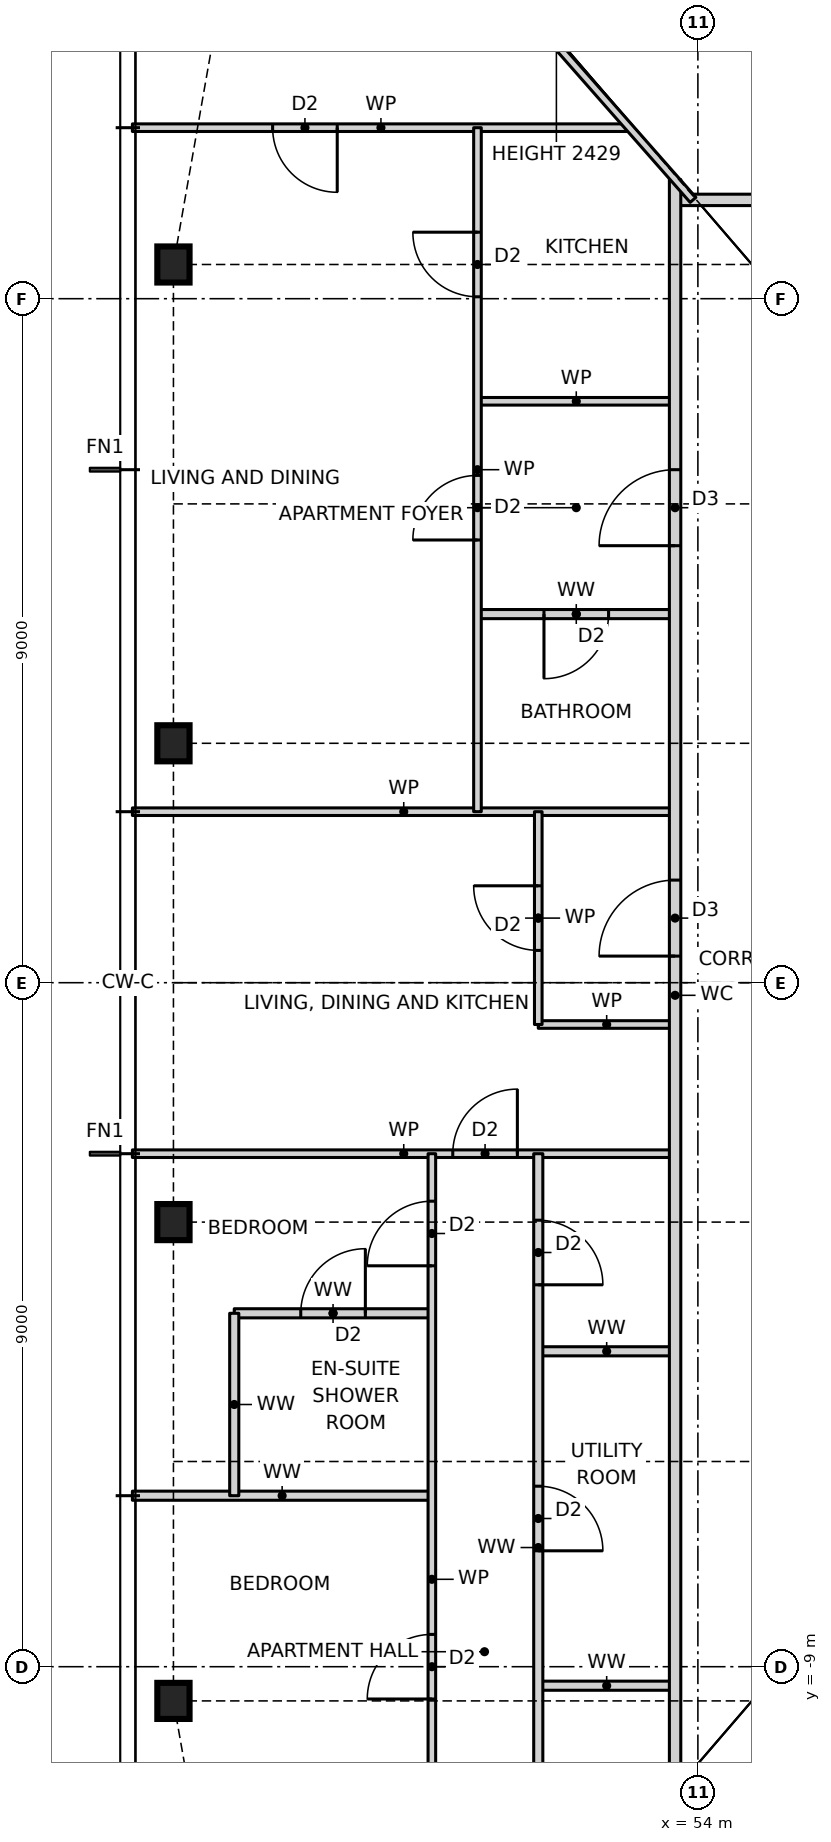
"""IFC4 building model, lengths in metres.
Left out: names, types, materials, properties, quantities, classifications, styles, units other than length and angle.
Written with IfcOpenShell. Run it as: python <this file> out.ifc"""

import sys

from ifc_helpers import new_model, si_unit, direction, frame, frame_2d, origin, origin_2d, place, context, subcontext, project, spatial, rectangle, i_section, extrude, element, fill, save


model = new_model("IFC4")
c1 = context("Model", 3, precision=1e-05, world=origin(), true_north=direction((0.0, 1.0)))
c2 = subcontext(c1, "Body", "Model", "MODEL_VIEW")
j1 = project(units=[si_unit("LENGTHUNIT", "METRE"), si_unit("PLANEANGLEUNIT", "RADIAN")], contexts=[c1])
p1 = place(None, origin())
s1 = spatial("IfcSite", under=j1, at=p1, CompositionType="ELEMENT")
p2 = place(p1, origin())
s2 = spatial("IfcBuilding", under=s1, at=p2, CompositionType="ELEMENT")
p3 = place(p2, frame((0.0, 0.0, 57.0)))
s3 = spatial("IfcBuildingStorey", under=s2, at=p3, CompositionType="ELEMENT", Elevation=57.0)
for number, where, z_axis, x_axis in (
    (1, (47.1, 9.45, 0.0), (0.0, 0.0, 1.0), (1.0, 0.0, 0.0)),
    (2, (47.1, 3.15, 0.0), (0.0, 0.0, 1.0), (1.0, 0.0, 0.0)),
    (3, (47.1, -3.15, 0.0), (0.0, 0.0, 1.0), (1.0, 0.0, 0.0)),
    (4, (47.1, -9.45, 0.0), (0.0, 0.0, 1.0), (1.0, 0.0, 0.0)),
):
    element("IfcColumn", number, at=place(p3, frame(where, z_axis=z_axis, x_axis=x_axis)), inside=s3, PredefinedType="COLUMN", context=c2, shape_type="SweptSolid", body=[
        extrude(i_section(OverallWidth=0.424, OverallDepth=0.475, WebThickness=0.048, FlangeThickness=0.077, at=origin_2d()), origin(), (0.0, 0.0, 1.0), 3.5),
    ])
p4 = place(p3, frame((51.9, -9.25, 0.0), z_axis=(0.0, 0.0, 1.0), x_axis=(1.0, 0.0, 0.0)))
e5 = element("IfcWall", 5, at=p4, inside=s3, PredefinedType="PARTITIONING", context=c2, shape_type="SweptSolid", body=[
    extrude(rectangle(XDim=1.8, YDim=0.12, at=frame_2d((0.9, 0.0))), origin(), (0.0, 0.0, 1.0), 3.27),
])
p5 = place(p3, frame((46.56, -6.75, 0.0), z_axis=(0.0, 0.0, 1.0), x_axis=(1.0, 0.0, 0.0)))
e6 = element("IfcWall", 6, at=p5, inside=s3, PredefinedType="PARTITIONING", context=c2, shape_type="SweptSolid", body=[
    extrude(rectangle(XDim=3.94, YDim=0.12, at=frame_2d((1.97, 0.0))), origin(), (0.0, 0.0, 1.0), 3.27),
])
p6 = place(p3, frame((51.9, -4.85, 0.0), z_axis=(0.0, 0.0, 1.0), x_axis=(1.0, 0.0, 0.0)))
e7 = element("IfcWall", 7, at=p6, inside=s3, PredefinedType="PARTITIONING", context=c2, shape_type="SweptSolid", body=[
    extrude(rectangle(XDim=1.8, YDim=0.12, at=frame_2d((0.9, 0.0))), origin(), (0.0, 0.0, 1.0), 3.27),
])
p7 = place(p3, frame((47.9, -4.35, 0.0), z_axis=(0.0, 0.0, 1.0), x_axis=(1.0, 0.0, 0.0)))
e8 = element("IfcWall", 8, at=p7, inside=s3, PredefinedType="PARTITIONING", context=c2, shape_type="SweptSolid", body=[
    extrude(rectangle(XDim=2.6, YDim=0.12, at=frame_2d((1.3, 0.0))), origin(), (0.0, 0.0, 1.0), 3.27),
])
p8 = place(p7, frame((0.875, 0.0, 0.0)))
e9 = element("IfcOpeningElement", 9, at=p8, cuts=e8, PredefinedType="OPENING", context=c2, shape_type="SweptSolid", body=[
    extrude(rectangle(XDim=0.85, YDim=2.1, at=frame_2d((0.425, 1.05))), frame((0.0, 0.07, 0.0), z_axis=(0.0, -1.0, 0.0), x_axis=(1.0, 0.0, 0.0)), (0.0, 0.0, 1.0), 0.14),
])
p9 = place(p3, frame((46.56, -2.25, 0.0), z_axis=(0.0, 0.0, 1.0), x_axis=(1.0, 0.0, 0.0)))
e10 = element("IfcWall", 10, at=p9, inside=s3, PredefinedType="PARTITIONING", context=c2, shape_type="SweptSolid", body=[
    extrude(rectangle(XDim=7.14, YDim=0.1, at=frame_2d((3.57, 0.0))), origin(), (0.0, 0.0, 1.0), 3.27),
])
p10 = place(p9, frame((4.215, 0.0, 0.0)))
e11 = element("IfcOpeningElement", 11, at=p10, cuts=e10, PredefinedType="OPENING", context=c2, shape_type="SweptSolid", body=[
    extrude(rectangle(XDim=0.85, YDim=2.1, at=frame_2d((0.425, 1.05))), frame((0.0, 0.06, 0.0), z_axis=(0.0, -1.0, 0.0), x_axis=(1.0, 0.0, 0.0)), (0.0, 0.0, 1.0), 0.12),
])
p11 = place(p3, frame((51.9, -0.55, 0.0), z_axis=(0.0, 0.0, 1.0), x_axis=(1.0, 0.0, 0.0)))
e12 = element("IfcWall", 12, at=p11, inside=s3, PredefinedType="PARTITIONING", context=c2, shape_type="SweptSolid", body=[
    extrude(rectangle(XDim=1.8, YDim=0.1, at=frame_2d((0.9, 0.0))), origin(), (0.0, 0.0, 1.0), 3.27),
])
p12 = place(p3, frame((46.56, 2.25, 0.0), z_axis=(0.0, 0.0, 1.0), x_axis=(1.0, 0.0, 0.0)))
e13 = element("IfcWall", 13, at=p12, inside=s3, PredefinedType="PARTITIONING", context=c2, shape_type="SweptSolid", body=[
    extrude(rectangle(XDim=7.14, YDim=0.1, at=frame_2d((3.57, 0.0))), origin(), (0.0, 0.0, 1.0), 3.27),
])
p13 = place(p3, frame((51.1, 4.85, 0.0), z_axis=(0.0, 0.0, 1.0), x_axis=(1.0, 0.0, 0.0)))
e14 = element("IfcWall", 14, at=p13, inside=s3, PredefinedType="PARTITIONING", context=c2, shape_type="SweptSolid", body=[
    extrude(rectangle(XDim=2.6, YDim=0.12, at=frame_2d((1.3, 0.0))), origin(), (0.0, 0.0, 1.0), 3.27),
])
p14 = place(p13, frame((0.875, 0.0, 0.0)))
e15 = element("IfcOpeningElement", 15, at=p14, cuts=e14, PredefinedType="OPENING", context=c2, shape_type="SweptSolid", body=[
    extrude(rectangle(XDim=0.85, YDim=2.1, at=frame_2d((0.425, 1.05))), frame((0.0, 0.07, 0.0), z_axis=(0.0, -1.0, 0.0), x_axis=(1.0, 0.0, 0.0)), (0.0, 0.0, 1.0), 0.14),
])
p15 = place(p3, frame((51.1, 7.65, 0.0), z_axis=(0.0, 0.0, 1.0), x_axis=(1.0, 0.0, 0.0)))
e16 = element("IfcWall", 16, at=p15, inside=s3, PredefinedType="PARTITIONING", context=c2, shape_type="SweptSolid", body=[
    extrude(rectangle(XDim=2.6, YDim=0.1, at=frame_2d((1.3, 0.0))), origin(), (0.0, 0.0, 1.0), 3.27),
])
p16 = place(p3, frame((53.7, 10.3, 0.0), z_axis=(0.0, 0.0, 1.0), x_axis=(1.0, 0.0, 0.0)))
e17 = element("IfcWall", 17, at=p16, inside=s3, PredefinedType="PARTITIONING", context=c2, shape_type="SweptSolid", body=[
    extrude(rectangle(XDim=18.6, YDim=0.15, at=frame_2d((9.3, 0.0))), origin(), (0.0, 0.0, 1.0), 3.27),
])
p17 = place(p16, frame((12.8, 0.0, 0.0)))
e18 = element("IfcOpeningElement", 18, at=p17, cuts=e17, PredefinedType="OPENING", context=c2, shape_type="SweptSolid", body=[
    extrude(rectangle(XDim=1.0, YDim=2.1, at=frame_2d((0.5, 1.05))), frame((0.0, 0.085, 0.0), z_axis=(0.0, -1.0, 0.0), x_axis=(1.0, 0.0, 0.0)), (0.0, 0.0, 1.0), 0.17),
])
p18 = place(p3, frame((46.56, 11.25, 0.0), z_axis=(0.0, 0.0, 1.0), x_axis=(1.0, 0.0, 0.0)))
e19 = element("IfcWall", 19, at=p18, inside=s3, PredefinedType="PARTITIONING", context=c2, shape_type="SweptSolid", body=[
    extrude(rectangle(XDim=6.54, YDim=0.1, at=frame_2d((3.27, 0.0))), origin(), (0.0, 0.0, 1.0), 3.27),
])
p19 = place(p18, frame((1.845, 0.0, 0.0)))
e20 = element("IfcOpeningElement", 20, at=p19, cuts=e19, PredefinedType="OPENING", context=c2, shape_type="SweptSolid", body=[
    extrude(rectangle(XDim=0.85, YDim=2.1, at=frame_2d((0.425, 1.05))), frame((0.0, 0.06, 0.0), z_axis=(0.0, -1.0, 0.0), x_axis=(1.0, 0.0, 0.0)), (0.0, 0.0, 1.0), 0.12),
])
p20 = place(p3, frame((53.7, -10.9, 0.0), z_axis=(0.0, 0.0, 1.0), x_axis=(0.0, 1.0, 0.0)))
e21 = element("IfcWall", 21, at=p20, inside=s3, PredefinedType="PARTITIONING", context=c2, shape_type="SweptSolid", body=[
    extrude(rectangle(XDim=21.468, YDim=0.15, at=frame_2d((10.734, 0.0))), origin(), (0.0, 0.0, 1.0), 3.27),
])
p21 = place(p20, frame((16.65, 0.0, 0.0)))
e22 = element("IfcOpeningElement", 22, at=p21, cuts=e21, PredefinedType="OPENING", context=c2, shape_type="SweptSolid", body=[
    extrude(rectangle(XDim=1.0, YDim=2.1, at=frame_2d((0.5, 1.05))), frame((0.0, 0.085, 0.0), z_axis=(0.0, -1.0, 0.0), x_axis=(1.0, 0.0, 0.0)), (0.0, 0.0, 1.0), 0.17),
])
p22 = place(p20, frame((11.25, 0.0, 0.0)))
e23 = element("IfcOpeningElement", 23, at=p22, cuts=e21, PredefinedType="OPENING", context=c2, shape_type="SweptSolid", body=[
    extrude(rectangle(XDim=1.0, YDim=2.1, at=frame_2d((0.5, 1.05))), frame((0.0, 0.085, 0.0), z_axis=(0.0, -1.0, 0.0), x_axis=(1.0, 0.0, 0.0)), (0.0, 0.0, 1.0), 0.17),
])
p23 = place(p3, frame((51.9, -12.614, 0.0), z_axis=(0.0, 0.0, 1.0), x_axis=(0.0, 1.0, 0.0)))
e24 = element("IfcWall", 24, at=p23, inside=s3, PredefinedType="PARTITIONING", context=c2, shape_type="SweptSolid", body=[
    extrude(rectangle(XDim=10.364, YDim=0.12, at=frame_2d((5.182, 0.0))), origin(), (0.0, 0.0, 1.0), 3.27),
])
p24 = place(p23, frame((8.639, 0.0, 0.0)))
e25 = element("IfcOpeningElement", 25, at=p24, cuts=e24, PredefinedType="OPENING", context=c2, shape_type="SweptSolid", body=[
    extrude(rectangle(XDim=0.85, YDim=2.1, at=frame_2d((0.425, 1.05))), frame((0.0, 0.07, 0.0), z_axis=(0.0, -1.0, 0.0), x_axis=(1.0, 0.0, 0.0)), (0.0, 0.0, 1.0), 0.14),
])
p25 = place(p23, frame((5.139, 0.0, 0.0)))
e26 = element("IfcOpeningElement", 26, at=p25, cuts=e24, PredefinedType="OPENING", context=c2, shape_type="SweptSolid", body=[
    extrude(rectangle(XDim=0.85, YDim=2.1, at=frame_2d((0.425, 1.05))), frame((0.0, 0.07, 0.0), z_axis=(0.0, -1.0, 0.0), x_axis=(1.0, 0.0, 0.0)), (0.0, 0.0, 1.0), 0.14),
])
p26 = place(p23, frame((1.257, 0.0, 0.0)))
e27 = element("IfcOpeningElement", 27, at=p26, cuts=e24, PredefinedType="OPENING", context=c2, shape_type="SweptSolid", body=[
    extrude(rectangle(XDim=0.85, YDim=2.1, at=frame_2d((0.425, 1.05))), frame((0.0, 0.07, 0.0), z_axis=(0.0, -1.0, 0.0), x_axis=(1.0, 0.0, 0.0)), (0.0, 0.0, 1.0), 0.14),
])
p27 = place(p3, frame((51.9, -0.55, 0.0), z_axis=(0.0, 0.0, 1.0), x_axis=(0.0, 1.0, 0.0)))
e28 = element("IfcWall", 28, at=p27, inside=s3, PredefinedType="PARTITIONING", context=c2, shape_type="SweptSolid", body=[
    extrude(rectangle(XDim=2.8, YDim=0.1, at=frame_2d((1.4, 0.0))), origin(), (0.0, 0.0, 1.0), 3.27),
])
p28 = place(p27, frame((0.975, 0.0, 0.0)))
e29 = element("IfcOpeningElement", 29, at=p28, cuts=e28, PredefinedType="OPENING", context=c2, shape_type="SweptSolid", body=[
    extrude(rectangle(XDim=0.85, YDim=2.1, at=frame_2d((0.425, 1.05))), frame((0.0, 0.06, 0.0), z_axis=(0.0, -1.0, 0.0), x_axis=(1.0, 0.0, 0.0)), (0.0, 0.0, 1.0), 0.12),
])
p29 = place(p3, frame((51.1, 2.25, 0.0), z_axis=(0.0, 0.0, 1.0), x_axis=(0.0, 1.0, 0.0)))
e30 = element("IfcWall", 30, at=p29, inside=s3, PredefinedType="PARTITIONING", context=c2, shape_type="SweptSolid", body=[
    extrude(rectangle(XDim=9.0, YDim=0.1, at=frame_2d((4.5, 0.0))), origin(), (0.0, 0.0, 1.0), 3.27),
])
p30 = place(p29, frame((6.775, 0.0, 0.0)))
e31 = element("IfcOpeningElement", 31, at=p30, cuts=e30, PredefinedType="OPENING", context=c2, shape_type="SweptSolid", body=[
    extrude(rectangle(XDim=0.85, YDim=2.1, at=frame_2d((0.425, 1.05))), frame((0.0, 0.06, 0.0), z_axis=(0.0, -1.0, 0.0), x_axis=(1.0, 0.0, 0.0)), (0.0, 0.0, 1.0), 0.12),
])
p31 = place(p29, frame((3.575, 0.0, 0.0)))
e32 = element("IfcOpeningElement", 32, at=p31, cuts=e30, PredefinedType="OPENING", context=c2, shape_type="SweptSolid", body=[
    extrude(rectangle(XDim=0.85, YDim=2.1, at=frame_2d((0.425, 1.05))), frame((0.0, 0.06, 0.0), z_axis=(0.0, -1.0, 0.0), x_axis=(1.0, 0.0, 0.0)), (0.0, 0.0, 1.0), 0.12),
])
p32 = place(p3, frame((50.5, -13.45, 0.0), z_axis=(0.0, 0.0, 1.0), x_axis=(0.0, 1.0, 0.0)))
e33 = element("IfcWall", 33, at=p32, inside=s3, PredefinedType="PARTITIONING", context=c2, shape_type="SweptSolid", body=[
    extrude(rectangle(XDim=11.2, YDim=0.1, at=frame_2d((5.6, 0.0))), origin(), (0.0, 0.0, 1.0), 3.27),
])
p33 = place(p32, frame((9.725, 0.0, 0.0)))
e34 = element("IfcOpeningElement", 34, at=p33, cuts=e33, PredefinedType="OPENING", context=c2, shape_type="SweptSolid", body=[
    extrude(rectangle(XDim=0.85, YDim=2.1, at=frame_2d((0.425, 1.05))), frame((0.0, 0.06, 0.0), z_axis=(0.0, -1.0, 0.0), x_axis=(1.0, 0.0, 0.0)), (0.0, 0.0, 1.0), 0.12),
])
p34 = place(p32, frame((4.025, 0.0, 0.0)))
e35 = element("IfcOpeningElement", 35, at=p34, cuts=e33, PredefinedType="OPENING", context=c2, shape_type="SweptSolid", body=[
    extrude(rectangle(XDim=0.85, YDim=2.1, at=frame_2d((0.425, 1.05))), frame((0.0, 0.06, 0.0), z_axis=(0.0, -1.0, 0.0), x_axis=(1.0, 0.0, 0.0)), (0.0, 0.0, 1.0), 0.12),
])
p35 = place(p32, frame((0.675, 0.0, 0.0)))
e36 = element("IfcOpeningElement", 36, at=p35, cuts=e33, PredefinedType="OPENING", context=c2, shape_type="SweptSolid", body=[
    extrude(rectangle(XDim=0.85, YDim=2.1, at=frame_2d((0.425, 1.05))), frame((0.0, 0.06, 0.0), z_axis=(0.0, -1.0, 0.0), x_axis=(1.0, 0.0, 0.0)), (0.0, 0.0, 1.0), 0.12),
])
p36 = place(p3, frame((47.9, -6.75, 0.0), z_axis=(0.0, 0.0, 1.0), x_axis=(0.0, 1.0, 0.0)))
e37 = element("IfcWall", 37, at=p36, inside=s3, PredefinedType="PARTITIONING", context=c2, shape_type="SweptSolid", body=[
    extrude(rectangle(XDim=2.4, YDim=0.12, at=frame_2d((1.2, 0.0))), origin(), (0.0, 0.0, 1.0), 3.27),
])
p37 = place(p3, frame((53.936, 10.3, 0.0), z_axis=(0.0, 0.0, 1.0), x_axis=(-0.660638210404, 0.750704439146, 0.0)))
e38 = element("IfcWall", 38, at=p37, inside=s3, PredefinedType="PARTITIONING", context=c2, shape_type="SweptSolid", body=[
    extrude(rectangle(XDim=9.07, YDim=0.1, at=frame_2d((4.535, 0.0))), origin(), (0.0, 0.0, 1.0), 2.429),
])
p38 = place(p30, origin())
e39 = element("IfcDoor", 39, at=p38, inside=s3, OperationType="SINGLE_SWING_RIGHT", PredefinedType="DOOR", context=c2, shape_type="SweptSolid", body=[
    extrude(rectangle(XDim=0.85, YDim=2.1, at=frame_2d((0.425, 1.05))), frame((0.0, 0.025, 0.0), z_axis=(0.0, -1.0, 0.0), x_axis=(1.0, 0.0, 0.0)), (0.0, 0.0, 1.0), 0.05),
])
fill(e31, e39)
p39 = place(p21, origin())
e40 = element("IfcDoor", 40, at=p39, inside=s3, OperationType="SINGLE_SWING_LEFT", PredefinedType="DOOR", context=c2, shape_type="SweptSolid", body=[
    extrude(rectangle(XDim=1.0, YDim=2.1, at=frame_2d((0.5, 1.05))), frame((0.0, 0.025, 0.0), z_axis=(0.0, -1.0, 0.0), x_axis=(1.0, 0.0, 0.0)), (0.0, 0.0, 1.0), 0.05),
])
fill(e22, e40)
p40 = place(p31, origin())
e41 = element("IfcDoor", 41, at=p40, inside=s3, OperationType="SINGLE_SWING_LEFT", PredefinedType="DOOR", context=c2, shape_type="SweptSolid", body=[
    extrude(rectangle(XDim=0.85, YDim=2.1, at=frame_2d((0.425, 1.05))), frame((0.0, 0.025, 0.0), z_axis=(0.0, -1.0, 0.0), x_axis=(1.0, 0.0, 0.0)), (0.0, 0.0, 1.0), 0.05),
])
fill(e32, e41)
p41 = place(p14, frame((0.85, 0.0, 0.0), z_axis=(0.0, 0.0, 1.0), x_axis=(-1.0, 0.0, 0.0)))
e42 = element("IfcDoor", 42, at=p41, inside=s3, OperationType="SINGLE_SWING_RIGHT", PredefinedType="DOOR", context=c2, shape_type="SweptSolid", body=[
    extrude(rectangle(XDim=0.85, YDim=2.1, at=frame_2d((0.425, 1.05))), frame((0.0, 0.025, 0.0), z_axis=(0.0, -1.0, 0.0), x_axis=(1.0, 0.0, 0.0)), (0.0, 0.0, 1.0), 0.05),
])
fill(e15, e42)
p42 = place(p19, frame((0.85, 0.0, 0.0), z_axis=(0.0, 0.0, 1.0), x_axis=(-1.0, 0.0, 0.0)))
e43 = element("IfcDoor", 43, at=p42, inside=s3, OperationType="SINGLE_SWING_LEFT", PredefinedType="DOOR", context=c2, shape_type="SweptSolid", body=[
    extrude(rectangle(XDim=0.85, YDim=2.1, at=frame_2d((0.425, 1.05))), frame((0.0, 0.025, 0.0), z_axis=(0.0, -1.0, 0.0), x_axis=(1.0, 0.0, 0.0)), (0.0, 0.0, 1.0), 0.05),
])
fill(e20, e43)
p43 = place(p22, origin())
e44 = element("IfcDoor", 44, at=p43, inside=s3, OperationType="SINGLE_SWING_LEFT", PredefinedType="DOOR", context=c2, shape_type="SweptSolid", body=[
    extrude(rectangle(XDim=1.0, YDim=2.1, at=frame_2d((0.5, 1.05))), frame((0.0, 0.025, 0.0), z_axis=(0.0, -1.0, 0.0), x_axis=(1.0, 0.0, 0.0)), (0.0, 0.0, 1.0), 0.05),
])
fill(e23, e44)
p44 = place(p28, origin())
e45 = element("IfcDoor", 45, at=p44, inside=s3, OperationType="SINGLE_SWING_RIGHT", PredefinedType="DOOR", context=c2, shape_type="SweptSolid", body=[
    extrude(rectangle(XDim=0.85, YDim=2.1, at=frame_2d((0.425, 1.05))), frame((0.0, 0.025, 0.0), z_axis=(0.0, -1.0, 0.0), x_axis=(1.0, 0.0, 0.0)), (0.0, 0.0, 1.0), 0.05),
])
fill(e29, e45)
p45 = place(p10, origin())
e46 = element("IfcDoor", 46, at=p45, inside=s3, OperationType="SINGLE_SWING_RIGHT", PredefinedType="DOOR", context=c2, shape_type="SweptSolid", body=[
    extrude(rectangle(XDim=0.85, YDim=2.1, at=frame_2d((0.425, 1.05))), frame((0.0, 0.025, 0.0), z_axis=(0.0, -1.0, 0.0), x_axis=(1.0, 0.0, 0.0)), (0.0, 0.0, 1.0), 0.05),
])
fill(e11, e46)
p46 = place(p8, origin())
e47 = element("IfcDoor", 47, at=p46, inside=s3, OperationType="SINGLE_SWING_RIGHT", PredefinedType="DOOR", context=c2, shape_type="SweptSolid", body=[
    extrude(rectangle(XDim=0.85, YDim=2.1, at=frame_2d((0.425, 1.05))), frame((0.0, 0.025, 0.0), z_axis=(0.0, -1.0, 0.0), x_axis=(1.0, 0.0, 0.0)), (0.0, 0.0, 1.0), 0.05),
])
fill(e9, e47)
p47 = place(p33, origin())
e48 = element("IfcDoor", 48, at=p47, inside=s3, OperationType="SINGLE_SWING_LEFT", PredefinedType="DOOR", context=c2, shape_type="SweptSolid", body=[
    extrude(rectangle(XDim=0.85, YDim=2.1, at=frame_2d((0.425, 1.05))), frame((0.0, 0.025, 0.0), z_axis=(0.0, -1.0, 0.0), x_axis=(1.0, 0.0, 0.0)), (0.0, 0.0, 1.0), 0.05),
])
fill(e34, e48)
p48 = place(p34, origin())
e49 = element("IfcDoor", 49, at=p48, inside=s3, OperationType="SINGLE_SWING_LEFT", PredefinedType="DOOR", context=c2, shape_type="SweptSolid", body=[
    extrude(rectangle(XDim=0.85, YDim=2.1, at=frame_2d((0.425, 1.05))), frame((0.0, 0.025, 0.0), z_axis=(0.0, -1.0, 0.0), x_axis=(1.0, 0.0, 0.0)), (0.0, 0.0, 1.0), 0.05),
])
fill(e35, e49)
p49 = place(p24, frame((0.85, 0.0, 0.0), z_axis=(0.0, 0.0, 1.0), x_axis=(-1.0, 0.0, 0.0)))
e50 = element("IfcDoor", 50, at=p49, inside=s3, OperationType="SINGLE_SWING_RIGHT", PredefinedType="DOOR", context=c2, shape_type="SweptSolid", body=[
    extrude(rectangle(XDim=0.85, YDim=2.1, at=frame_2d((0.425, 1.05))), frame((0.0, 0.025, 0.0), z_axis=(0.0, -1.0, 0.0), x_axis=(1.0, 0.0, 0.0)), (0.0, 0.0, 1.0), 0.05),
])
fill(e25, e50)
p50 = place(p25, frame((0.85, 0.0, 0.0), z_axis=(0.0, 0.0, 1.0), x_axis=(-1.0, 0.0, 0.0)))
e51 = element("IfcDoor", 51, at=p50, inside=s3, OperationType="SINGLE_SWING_RIGHT", PredefinedType="DOOR", context=c2, shape_type="SweptSolid", body=[
    extrude(rectangle(XDim=0.85, YDim=2.1, at=frame_2d((0.425, 1.05))), frame((0.0, 0.025, 0.0), z_axis=(0.0, -1.0, 0.0), x_axis=(1.0, 0.0, 0.0)), (0.0, 0.0, 1.0), 0.05),
])
fill(e26, e51)
save(model, sys.argv[1])
